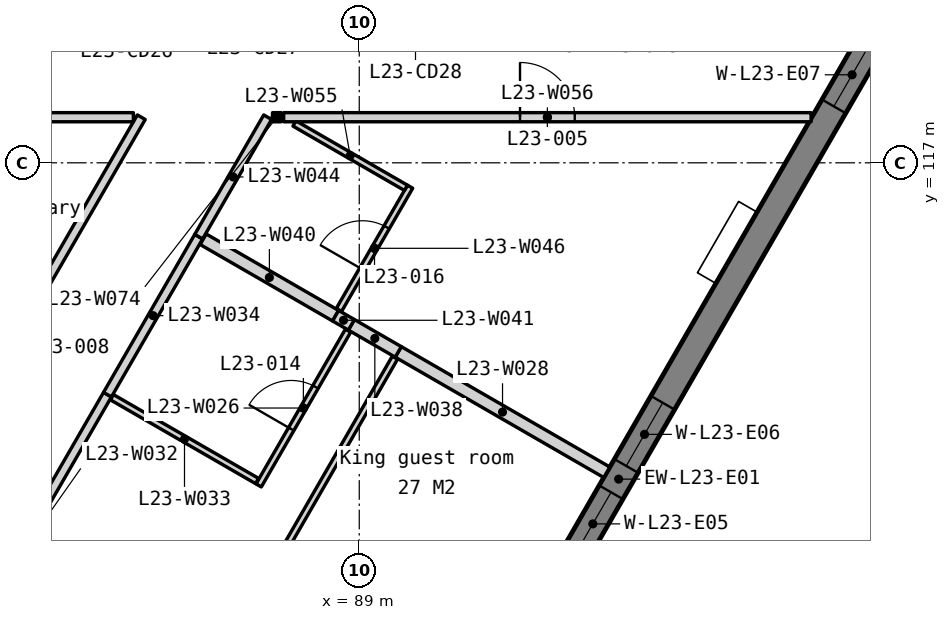
"""IFC4 building model, lengths in metres.
Left out: names, types, materials, properties, quantities, classifications, styles, units other than length and angle.
Written with IfcOpenShell. Run it as: python <this file> out.ifc"""

import sys

from ifc_helpers import new_model, si_unit, direction, frame, frame_2d, origin, place, context, subcontext, project, spatial, polyline, rectangle, outline, extrude, element, fill, save


model = new_model("IFC4")
c1 = context("Model", 3, precision=1e-05, world=origin(), true_north=direction((0.0, 1.0)))
c2 = subcontext(c1, "Body", "Model", "MODEL_VIEW")
j1 = project(units=[si_unit("LENGTHUNIT", "METRE"), si_unit("PLANEANGLEUNIT", "RADIAN")], contexts=[c1])
p1 = place(None, origin())
s1 = spatial("IfcSite", under=j1, at=p1, CompositionType="ELEMENT")
p2 = place(p1, origin())
s2 = spatial("IfcBuilding", under=s1, at=p2, CompositionType="ELEMENT")
p3 = place(p2, frame((0.0, 0.0, 95.8)))
s3 = spatial("IfcBuildingStorey", under=s2, at=p3, CompositionType="ELEMENT", Elevation=95.8)
p4 = place(p3, frame((82.605, 93.333, -0.15), z_axis=(0.0, 0.0, 1.0), x_axis=(0.500000478905, 0.866025127289, 0.0)))
e1 = element("IfcWall", 1, at=p4, inside=s3, PredefinedType="SOLIDWALL", context=c2, shape_type="SweptSolid", body=[
    extrude(outline(polyline([(42.643, 0.0), (42.643, 3.5), (0.0, 3.5), (0.0, 0.0), (42.643, 0.0)])), frame((0.0, 0.225, 0.0), z_axis=(0.0, -1.0, 0.0), x_axis=(1.0, 0.0, 0.0)), (0.0, 0.0, 1.0), 0.45),
])
p5 = place(p4, frame((2.814, 0.0, 1.05)))
e2 = element("IfcOpeningElement", 2, at=p5, cuts=e1, PredefinedType="OPENING", context=c2, shape_type="SweptSolid", body=[
    extrude(rectangle(XDim=1.2, YDim=1.5, at=frame_2d((0.6, 0.75))), frame((0.0, 0.235, 0.0), z_axis=(0.0, -1.0, 0.0), x_axis=(1.0, 0.0, 0.0)), (0.0, 0.0, 1.0), 0.47),
])
p6 = place(p4, frame((4.514, 0.0, 1.05)))
e3 = element("IfcOpeningElement", 3, at=p6, cuts=e1, PredefinedType="OPENING", context=c2, shape_type="SweptSolid", body=[
    extrude(rectangle(XDim=1.2, YDim=1.5, at=frame_2d((0.6, 0.75))), frame((0.0, 0.235, 0.0), z_axis=(0.0, -1.0, 0.0), x_axis=(1.0, 0.0, 0.0)), (0.0, 0.0, 1.0), 0.47),
])
p7 = place(p4, frame((11.343, 0.0, 1.05)))
e4 = element("IfcOpeningElement", 4, at=p7, cuts=e1, PredefinedType="OPENING", context=c2, shape_type="SweptSolid", body=[
    extrude(rectangle(XDim=1.2, YDim=1.5, at=frame_2d((0.6, 0.75))), frame((0.0, 0.235, 0.0), z_axis=(0.0, -1.0, 0.0), x_axis=(1.0, 0.0, 0.0)), (0.0, 0.0, 1.0), 0.47),
])
p8 = place(p4, frame((13.043, 0.0, 1.05)))
e5 = element("IfcOpeningElement", 5, at=p8, cuts=e1, PredefinedType="OPENING", context=c2, shape_type="SweptSolid", body=[
    extrude(rectangle(XDim=1.2, YDim=1.5, at=frame_2d((0.6, 0.75))), frame((0.0, 0.235, 0.0), z_axis=(0.0, -1.0, 0.0), x_axis=(1.0, 0.0, 0.0)), (0.0, 0.0, 1.0), 0.47),
])
p9 = place(p4, frame((19.872, 0.0, 1.05)))
e6 = element("IfcOpeningElement", 6, at=p9, cuts=e1, PredefinedType="OPENING", context=c2, shape_type="SweptSolid", body=[
    extrude(rectangle(XDim=1.2, YDim=1.5, at=frame_2d((0.6, 0.75))), frame((0.0, 0.235, 0.0), z_axis=(0.0, -1.0, 0.0), x_axis=(1.0, 0.0, 0.0)), (0.0, 0.0, 1.0), 0.47),
])
p10 = place(p4, frame((21.572, 0.0, 1.05)))
e7 = element("IfcOpeningElement", 7, at=p10, cuts=e1, PredefinedType="OPENING", context=c2, shape_type="SweptSolid", body=[
    extrude(rectangle(XDim=1.2, YDim=1.5, at=frame_2d((0.6, 0.75))), frame((0.0, 0.235, 0.0), z_axis=(0.0, -1.0, 0.0), x_axis=(1.0, 0.0, 0.0)), (0.0, 0.0, 1.0), 0.47),
])
p11 = place(p4, frame((28.4, 0.0, 1.05)))
e8 = element("IfcOpeningElement", 8, at=p11, cuts=e1, PredefinedType="OPENING", context=c2, shape_type="SweptSolid", body=[
    extrude(rectangle(XDim=1.2, YDim=1.5, at=frame_2d((0.6, 0.75))), frame((0.0, 0.235, 0.0), z_axis=(0.0, -1.0, 0.0), x_axis=(1.0, 0.0, 0.0)), (0.0, 0.0, 1.0), 0.47),
])
p12 = place(p4, frame((30.1, 0.0, 1.05)))
e9 = element("IfcOpeningElement", 9, at=p12, cuts=e1, PredefinedType="OPENING", context=c2, shape_type="SweptSolid", body=[
    extrude(rectangle(XDim=1.2, YDim=1.5, at=frame_2d((0.6, 0.75))), frame((0.0, 0.235, 0.0), z_axis=(0.0, -1.0, 0.0), x_axis=(1.0, 0.0, 0.0)), (0.0, 0.0, 1.0), 0.47),
])
p13 = place(p4, frame((36.929, 0.0, 1.05)))
e10 = element("IfcOpeningElement", 10, at=p13, cuts=e1, PredefinedType="OPENING", context=c2, shape_type="SweptSolid", body=[
    extrude(rectangle(XDim=1.2, YDim=1.5, at=frame_2d((0.6, 0.75))), frame((0.0, 0.235, 0.0), z_axis=(0.0, -1.0, 0.0), x_axis=(1.0, 0.0, 0.0)), (0.0, 0.0, 1.0), 0.47),
])
p14 = place(p4, frame((38.629, 0.0, 1.05)))
e11 = element("IfcOpeningElement", 11, at=p14, cuts=e1, PredefinedType="OPENING", context=c2, shape_type="SweptSolid", body=[
    extrude(rectangle(XDim=1.2, YDim=1.5, at=frame_2d((0.6, 0.75))), frame((0.0, 0.235, 0.0), z_axis=(0.0, -1.0, 0.0), x_axis=(1.0, 0.0, 0.0)), (0.0, 0.0, 1.0), 0.47),
])
p15 = place(p3, frame((81.024, 110.145, 0.0), z_axis=(0.0, 0.0, 1.0), x_axis=(0.499999202763, 0.866025864069, 0.0)))
e12 = element("IfcWall", 12, at=p15, inside=s3, PredefinedType="PARTITIONING", context=c2, shape_type="SweptSolid", body=[
    extrude(rectangle(XDim=8.782, YDim=0.15, at=frame_2d((4.391, 0.0))), origin(), (0.0, 0.0, 1.0), 3.35),
])
p16 = place(p15, frame((3.491, 0.0, 0.0)))
e13 = element("IfcOpeningElement", 13, at=p16, cuts=e12, PredefinedType="OPENING", context=c2, shape_type="SweptSolid", body=[
    extrude(rectangle(XDim=1.8, YDim=2.1, at=frame_2d((0.9, 1.05))), frame((0.0, 0.085, 0.0), z_axis=(0.0, -1.0, 0.0), x_axis=(1.0, 0.0, 0.0)), (0.0, 0.0, 1.0), 0.17),
])
p17 = place(p3, frame((87.346, 111.694, 0.0), z_axis=(0.0, 0.0, 1.0), x_axis=(0.499988418424, 0.866032090307, 0.0)))
e14 = element("IfcWall", 14, at=p17, inside=s3, PredefinedType="PARTITIONING", context=c2, shape_type="SweptSolid", body=[
    extrude(rectangle(XDim=2.94, YDim=0.1, at=frame_2d((1.47, 0.0))), origin(), (0.0, 0.0, 1.0), 3.35),
])
p18 = place(p17, frame((1.07, 0.0, 0.0)))
e15 = element("IfcOpeningElement", 15, at=p18, cuts=e14, PredefinedType="OPENING", context=c2, shape_type="SweptSolid", body=[
    extrude(rectangle(XDim=0.8, YDim=2.1, at=frame_2d((0.4, 1.05))), frame((0.0, 0.06, 0.0), z_axis=(0.0, -1.0, 0.0), x_axis=(1.0, 0.0, 0.0)), (0.0, 0.0, 1.0), 0.12),
])
p19 = place(p3, frame((89.642, 113.89, 0.0), z_axis=(0.0, 0.0, 1.0), x_axis=(0.865999754636, -0.500044422998, 0.0)))
e16 = element("IfcWall", 16, at=p19, inside=s3, PredefinedType="PARTITIONING", context=c2, shape_type="SweptSolid", body=[
    extrude(rectangle(XDim=3.96, YDim=0.2, at=frame_2d((1.98, 0.0))), origin(), (0.0, 0.0, 1.0), 3.35),
])
p20 = place(p3, frame((81.053, 106.594, 0.0), z_axis=(0.0, 0.0, 1.0), x_axis=(0.500005612204, 0.866022163553, 0.0)))
e17 = element("IfcWall", 17, at=p20, inside=s3, PredefinedType="PARTITIONING", context=c2, shape_type="SweptSolid", body=[
    extrude(rectangle(XDim=7.613, YDim=0.15, at=frame_2d((3.806, 0.0))), origin(), (0.0, 0.0, 1.0), 3.35),
])
p21 = place(p20, frame((3.306, 0.0, 0.0)))
e18 = element("IfcOpeningElement", 18, at=p21, cuts=e17, PredefinedType="OPENING", context=c2, shape_type="SweptSolid", body=[
    extrude(rectangle(XDim=1.0, YDim=2.1, at=frame_2d((0.5, 1.05))), frame((0.0, 0.085, 0.0), z_axis=(0.0, -1.0, 0.0), x_axis=(1.0, 0.0, 0.0)), (0.0, 0.0, 1.0), 0.17),
])
p22 = place(p3, frame((84.933, 113.145, 0.0), z_axis=(0.0, 0.0, 1.0), x_axis=(0.866004076171, -0.500036938691, 0.0)))
e19 = element("IfcWall", 19, at=p22, inside=s3, PredefinedType="PARTITIONING", context=c2, shape_type="SweptSolid", body=[
    extrude(rectangle(XDim=2.755, YDim=0.1, at=frame_2d((1.377, 0.0))), origin(), (0.0, 0.0, 1.0), 3.35),
])
p23 = place(p3, frame((84.859, 113.187, 0.0), z_axis=(0.0, 0.0, 1.0), x_axis=(0.50002537861, 0.866010750942, 0.0)))
e20 = element("IfcWall", 20, at=p23, inside=s3, PredefinedType="PARTITIONING", context=c2, shape_type="SweptSolid", body=[
    extrude(rectangle(XDim=3.0, YDim=0.15, at=frame_2d((1.5, 0.0))), origin(), (0.0, 0.0, 1.0), 3.35),
])
p24 = place(p3, frame((83.309, 102.902, 0.0), z_axis=(0.0, 0.0, 1.0), x_axis=(0.499318389478, 0.866418574322, 0.0)))
e21 = element("IfcWall", 21, at=p24, inside=s3, PredefinedType="PARTITIONING", context=c2, shape_type="SweptSolid", body=[
    extrude(rectangle(XDim=12.573, YDim=0.1, at=frame_2d((6.286, 0.0))), origin(), (0.0, 0.0, 1.0), 3.35),
])
p25 = place(p24, frame((5.836, 0.0, 0.0)))
e22 = element("IfcOpeningElement", 22, at=p25, cuts=e21, PredefinedType="OPENING", context=c2, shape_type="SweptSolid", body=[
    extrude(rectangle(XDim=0.9, YDim=2.1, at=frame_2d((0.45, 1.05))), frame((0.0, 0.06, 0.0), z_axis=(0.0, -1.0, 0.0), x_axis=(1.0, 0.0, 0.0)), (0.0, 0.0, 1.0), 0.12),
])
p26 = place(p3, frame((88.871, 114.335, 0.0), z_axis=(0.0, 0.0, 1.0), x_axis=(0.866107930713, -0.499857031916, 0.0)))
e23 = element("IfcWall", 23, at=p26, inside=s3, PredefinedType="PARTITIONING", context=c2, shape_type="SweptSolid", body=[
    extrude(rectangle(XDim=0.89, YDim=0.2, at=frame_2d((0.445, 0.0))), origin(), (0.0, 0.0, 1.0), 3.35),
])
p27 = place(p3, frame((86.433, 115.743, 0.0), z_axis=(0.0, 0.0, 1.0), x_axis=(0.866072439398, -0.499918523077, 0.0)))
e24 = element("IfcWall", 24, at=p27, inside=s3, PredefinedType="PARTITIONING", context=c2, shape_type="SweptSolid", body=[
    extrude(rectangle(XDim=2.515, YDim=0.2, at=frame_2d((1.258, 0.0))), origin(), (0.0, 0.0, 1.0), 3.35),
])
p28 = place(p3, frame((88.611, 114.485, 0.0), z_axis=(0.0, 0.0, 1.0), x_axis=(0.865778900179, -0.500426713919, 0.0)))
e25 = element("IfcWall", 25, at=p28, inside=s3, PredefinedType="PARTITIONING", context=c2, shape_type="SweptSolid", body=[
    extrude(rectangle(XDim=0.3, YDim=0.2, at=frame_2d((0.15, 0.0))), origin(), (0.0, 0.0, 1.0), 3.35),
])
p29 = place(p3, frame((86.359, 115.785, 0.0), z_axis=(0.0, 0.0, 1.0), x_axis=(0.499958437573, 0.866049398533, 0.0)))
e26 = element("IfcWall", 26, at=p29, inside=s3, PredefinedType="PARTITIONING", context=c2, shape_type="SweptSolid", body=[
    extrude(rectangle(XDim=2.269, YDim=0.15, at=frame_2d((1.134, 0.0))), origin(), (0.0, 0.0, 1.0), 3.35),
])
p30 = place(p3, frame((88.666, 114.581, 0.0), z_axis=(0.0, 0.0, 1.0), x_axis=(0.499999433879, 0.866025730634, 0.0)))
e27 = element("IfcWall", 27, at=p30, inside=s3, PredefinedType="PARTITIONING", context=c2, shape_type="SweptSolid", body=[
    extrude(rectangle(XDim=2.34, YDim=0.1, at=frame_2d((1.17, 0.0))), origin(), (0.0, 0.0, 1.0), 3.35),
])
p31 = place(p30, frame((0.77, 0.0, 0.0)))
e28 = element("IfcOpeningElement", 28, at=p31, cuts=e27, PredefinedType="OPENING", context=c2, shape_type="SweptSolid", body=[
    extrude(rectangle(XDim=0.8, YDim=2.1, at=frame_2d((0.4, 1.05))), frame((0.0, 0.06, 0.0), z_axis=(0.0, -1.0, 0.0), x_axis=(1.0, 0.0, 0.0)), (0.0, 0.0, 1.0), 0.12),
])
p32 = place(p3, frame((80.0, 117.75, 0.0), z_axis=(0.0, 0.0, 1.0), x_axis=(1.0, 0.0, 0.0)))
e29 = element("IfcWall", 29, at=p32, inside=s3, PredefinedType="PARTITIONING", context=c2, shape_type="SweptSolid", body=[
    extrude(rectangle(XDim=5.285, YDim=0.15, at=frame_2d((2.643, 0.0))), origin(), (0.0, 0.0, 1.0), 3.35),
])
p33 = place(p3, frame((87.934, 117.647, 0.0), z_axis=(0.0, 0.0, 1.0), x_axis=(0.866028160477, -0.499995225238, 0.0)))
e30 = element("IfcWall", 30, at=p33, inside=s3, PredefinedType="PARTITIONING", context=c2, shape_type="SweptSolid", body=[
    extrude(rectangle(XDim=2.118, YDim=0.1, at=frame_2d((1.059, 0.0))), origin(), (0.0, 0.0, 1.0), 3.35),
])
p34 = place(p3, frame((87.756, 117.75, 0.0), z_axis=(0.0, 0.0, 1.0), x_axis=(1.0, 0.0, 0.0)))
e31 = element("IfcWall", 31, at=p34, inside=s3, PredefinedType="PARTITIONING", context=c2, shape_type="SweptSolid", body=[
    extrude(rectangle(XDim=8.675, YDim=0.15, at=frame_2d((4.337, 0.0))), origin(), (0.0, 0.0, 1.0), 3.35),
])
p35 = place(p34, frame((3.887, 0.0, 0.0)))
e32 = element("IfcOpeningElement", 32, at=p35, cuts=e31, PredefinedType="OPENING", context=c2, shape_type="SweptSolid", body=[
    extrude(rectangle(XDim=0.9, YDim=2.1, at=frame_2d((0.45, 1.05))), frame((0.0, 0.085, 0.0), z_axis=(0.0, -1.0, 0.0), x_axis=(1.0, 0.0, 0.0)), (0.0, 0.0, 1.0), 0.17),
])
p36 = place(p3, frame((87.574, 117.75, 0.0), z_axis=(0.0, 0.0, 1.0), x_axis=(1.0, 0.0, 0.0)))
e33 = element("IfcWall", 33, at=p36, inside=s3, PredefinedType="PARTITIONING", context=c2, shape_type="SweptSolid", body=[
    extrude(rectangle(XDim=0.143, YDim=0.15, at=frame_2d((0.071, 0.0))), origin(), (0.0, 0.0, 1.0), 3.35),
])
p37 = place(p9, origin())
e34 = element("IfcWindow", 34, at=p37, inside=s3, PartitioningType="SINGLE_PANEL", PredefinedType="WINDOW", context=c2, shape_type="SweptSolid", body=[
    extrude(rectangle(XDim=1.2, YDim=1.5, at=frame_2d((0.6, 0.75))), frame((0.0, 0.03, 0.0), z_axis=(0.0, -1.0, 0.0), x_axis=(1.0, 0.0, 0.0)), (0.0, 0.0, 1.0), 0.06),
])
fill(e6, e34)
p38 = place(p10, origin())
e35 = element("IfcWindow", 35, at=p38, inside=s3, PartitioningType="SINGLE_PANEL", PredefinedType="WINDOW", context=c2, shape_type="SweptSolid", body=[
    extrude(rectangle(XDim=1.2, YDim=1.5, at=frame_2d((0.6, 0.75))), frame((0.0, 0.03, 0.0), z_axis=(0.0, -1.0, 0.0), x_axis=(1.0, 0.0, 0.0)), (0.0, 0.0, 1.0), 0.06),
])
fill(e7, e35)
p39 = place(p11, origin())
e36 = element("IfcWindow", 36, at=p39, inside=s3, PartitioningType="SINGLE_PANEL", PredefinedType="WINDOW", context=c2, shape_type="SweptSolid", body=[
    extrude(rectangle(XDim=1.2, YDim=1.5, at=frame_2d((0.6, 0.75))), frame((0.0, 0.03, 0.0), z_axis=(0.0, -1.0, 0.0), x_axis=(1.0, 0.0, 0.0)), (0.0, 0.0, 1.0), 0.06),
])
fill(e8, e36)
p40 = place(p35, origin())
e37 = element("IfcDoor", 37, at=p40, inside=s3, OperationType="SINGLE_SWING_LEFT", PredefinedType="DOOR", context=c2, shape_type="SweptSolid", body=[
    extrude(rectangle(XDim=0.9, YDim=2.1, at=frame_2d((0.45, 1.05))), frame((0.0, 0.025, 0.0), z_axis=(0.0, -1.0, 0.0), x_axis=(1.0, 0.0, 0.0)), (0.0, 0.0, 1.0), 0.05),
])
fill(e32, e37)
p41 = place(p18, origin())
e38 = element("IfcDoor", 38, at=p41, inside=s3, OperationType="SINGLE_SWING_LEFT", PredefinedType="DOOR", context=c2, shape_type="SweptSolid", body=[
    extrude(rectangle(XDim=0.8, YDim=2.1, at=frame_2d((0.4, 1.05))), frame((0.0, 0.025, 0.0), z_axis=(0.0, -1.0, 0.0), x_axis=(1.0, 0.0, 0.0)), (0.0, 0.0, 1.0), 0.05),
])
fill(e15, e38)
p42 = place(p31, origin())
e39 = element("IfcDoor", 39, at=p42, inside=s3, OperationType="SINGLE_SWING_LEFT", PredefinedType="DOOR", context=c2, shape_type="SweptSolid", body=[
    extrude(rectangle(XDim=0.8, YDim=2.1, at=frame_2d((0.4, 1.05))), frame((0.0, 0.025, 0.0), z_axis=(0.0, -1.0, 0.0), x_axis=(1.0, 0.0, 0.0)), (0.0, 0.0, 1.0), 0.05),
])
fill(e28, e39)
save(model, sys.argv[1])
